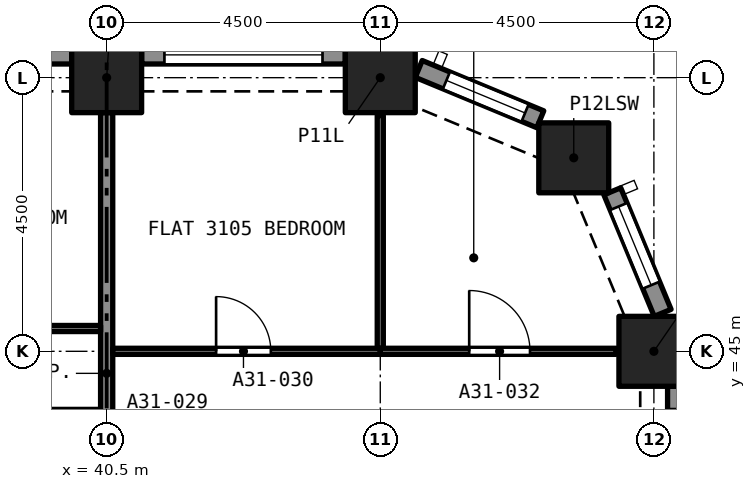
"""IFC4 building model, lengths in metres.
Left out: names, types, materials, properties, quantities, classifications, styles, units other than length and angle.
Written with IfcOpenShell. Run it as: python <this file> out.ifc"""

import sys

from ifc_helpers import new_model, si_unit, direction, frame, frame_2d, origin, origin_2d, place, context, subcontext, project, spatial, rectangle, extrude, element, fill, save


model = new_model("IFC4")
c1 = context("Model", 3, precision=1e-05, world=origin(), true_north=direction((0.0, 1.0)))
c2 = subcontext(c1, "Body", "Model", "MODEL_VIEW")
j1 = project(units=[si_unit("LENGTHUNIT", "METRE"), si_unit("PLANEANGLEUNIT", "RADIAN")], contexts=[c1])
p1 = place(None, origin())
s1 = spatial("IfcSite", under=j1, at=p1, CompositionType="ELEMENT")
p2 = place(p1, origin())
s2 = spatial("IfcBuilding", under=s1, at=p2, CompositionType="ELEMENT")
p3 = place(p2, frame((0.0, 0.0, 112.0)))
s3 = spatial("IfcBuildingStorey", under=s2, at=p3, CompositionType="ELEMENT", Elevation=112.0)
for number, where, z_axis, x_axis in (
    (1, (49.5, 45.0, 0.0), (0.0, 0.0, 1.0), (1.0, 0.0, 0.0)),
    (2, (48.182, 48.182, 0.0), (0.0, 0.0, 1.0), (1.0, 0.0, 0.0)),
    (3, (40.5, 49.5, 0.0), (0.0, 0.0, 1.0), (1.0, 0.0, 0.0)),
    (4, (45.0, 49.5, 0.0), (0.0, 0.0, 1.0), (1.0, 0.0, 0.0)),
):
    element("IfcColumn", number, at=place(p3, frame(where, z_axis=z_axis, x_axis=x_axis)), inside=s3, PredefinedType="COLUMN", context=c2, shape_type="SweptSolid", body=[
        extrude(rectangle(XDim=1.15, YDim=1.15, at=origin_2d()), origin(), (0.0, 0.0, 1.0), 3.2),
    ])
p4 = place(p3, frame((49.875, 44.425, 0.0), z_axis=(0.0, 0.0, 1.0), x_axis=(0.0, -1.0, 0.0)))
e5 = element("IfcWall", 5, at=p4, inside=s3, PredefinedType="SOLIDWALL", context=c2, shape_type="SweptSolid", body=[
    extrude(rectangle(XDim=3.35, YDim=0.3, at=frame_2d((1.675, 0.0))), origin(), (0.0, 0.0, 1.0), 3.2),
])
p5 = place(p4, frame((0.375, 0.0, 0.45)))
e6 = element("IfcOpeningElement", 6, at=p5, cuts=e5, PredefinedType="OPENING", context=c2, shape_type="SweptSolid", body=[
    extrude(rectangle(XDim=2.6, YDim=1.95, at=frame_2d((1.3, 0.975))), frame((0.0, 0.16, 0.0), z_axis=(0.0, -1.0, 0.0), x_axis=(1.0, 0.0, 0.0)), (0.0, 0.0, 1.0), 0.32),
])
p6 = place(p3, frame((48.816, 47.631, 0.0), z_axis=(0.0, 0.0, 1.0), x_axis=(0.382723818695, -0.923862802911, 0.0)))
e7 = element("IfcWall", 7, at=p6, inside=s3, PredefinedType="SOLIDWALL", context=c2, shape_type="SweptSolid", body=[
    extrude(rectangle(XDim=2.164, YDim=0.3, at=frame_2d((1.082, 0.0))), origin(), (0.0, 0.0, 1.0), 3.2),
])
p7 = place(p6, frame((0.271, 0.0, 0.45)))
e8 = element("IfcOpeningElement", 8, at=p7, cuts=e7, PredefinedType="OPENING", context=c2, shape_type="SweptSolid", body=[
    extrude(rectangle(XDim=1.4, YDim=1.95, at=frame_2d((0.7, 0.975))), frame((0.0, 0.16, 0.0), z_axis=(0.0, -1.0, 0.0), x_axis=(1.0, 0.0, 0.0)), (0.0, 0.0, 1.0), 0.32),
])
p8 = place(p3, frame((45.632, 49.644, 0.0), z_axis=(0.0, 0.0, 1.0), x_axis=(0.923862802911, -0.382723818695, 0.0)))
e9 = element("IfcWall", 9, at=p8, inside=s3, PredefinedType="SOLIDWALL", context=c2, shape_type="SweptSolid", body=[
    extrude(rectangle(XDim=2.164, YDim=0.3, at=frame_2d((1.082, 0.0))), origin(), (0.0, 0.0, 1.0), 3.2),
])
p9 = place(p8, frame((0.493, 0.0, 0.45)))
e10 = element("IfcOpeningElement", 10, at=p9, cuts=e9, PredefinedType="OPENING", context=c2, shape_type="SweptSolid", body=[
    extrude(rectangle(XDim=1.4, YDim=1.95, at=frame_2d((0.7, 0.975))), frame((0.0, 0.16, 0.0), z_axis=(0.0, -1.0, 0.0), x_axis=(1.0, 0.0, 0.0)), (0.0, 0.0, 1.0), 0.32),
])
p10 = place(p3, frame((41.075, 49.875, 0.0), z_axis=(0.0, 0.0, 1.0), x_axis=(1.0, 0.0, 0.0)))
e11 = element("IfcWall", 11, at=p10, inside=s3, PredefinedType="SOLIDWALL", context=c2, shape_type="SweptSolid", body=[
    extrude(rectangle(XDim=3.35, YDim=0.3, at=frame_2d((1.675, 0.0))), origin(), (0.0, 0.0, 1.0), 3.2),
])
p11 = place(p10, frame((0.375, 0.0, 0.45)))
e12 = element("IfcOpeningElement", 12, at=p11, cuts=e11, PredefinedType="OPENING", context=c2, shape_type="SweptSolid", body=[
    extrude(rectangle(XDim=2.6, YDim=1.95, at=frame_2d((1.3, 0.975))), frame((0.0, 0.16, 0.0), z_axis=(0.0, -1.0, 0.0), x_axis=(1.0, 0.0, 0.0)), (0.0, 0.0, 1.0), 0.32),
])
p12 = place(p3, frame((36.575, 49.875, 0.0), z_axis=(0.0, 0.0, 1.0), x_axis=(1.0, 0.0, 0.0)))
e13 = element("IfcWall", 13, at=p12, inside=s3, PredefinedType="SOLIDWALL", context=c2, shape_type="SweptSolid", body=[
    extrude(rectangle(XDim=3.35, YDim=0.3, at=frame_2d((1.675, 0.0))), origin(), (0.0, 0.0, 1.0), 3.2),
])
p13 = place(p12, frame((0.375, 0.0, 0.45)))
e14 = element("IfcOpeningElement", 14, at=p13, cuts=e13, PredefinedType="OPENING", context=c2, shape_type="SweptSolid", body=[
    extrude(rectangle(XDim=2.6, YDim=1.95, at=frame_2d((1.3, 0.975))), frame((0.0, 0.16, 0.0), z_axis=(0.0, -1.0, 0.0), x_axis=(1.0, 0.0, 0.0)), (0.0, 0.0, 1.0), 0.32),
])
p14 = place(p3, frame((40.5, 40.35, 0.0), z_axis=(0.0, 0.0, 1.0), x_axis=(0.0, 1.0, 0.0)))
e15 = element("IfcWall", 15, at=p14, inside=s3, PredefinedType="PARTITIONING", context=c2, shape_type="SweptSolid", body=[
    extrude(rectangle(XDim=8.575, YDim=0.2, at=frame_2d((4.288, 0.0))), origin(), (0.0, 0.0, 1.0), 2.9),
])
p15 = place(p3, frame((40.6, 45.0, 0.0), z_axis=(0.0, 0.0, 1.0), x_axis=(1.0, 0.0, 0.0)))
e16 = element("IfcWall", 16, at=p15, inside=s3, PredefinedType="PARTITIONING", context=c2, shape_type="SweptSolid", body=[
    extrude(rectangle(XDim=4.4, YDim=0.1, at=frame_2d((2.2, 0.0))), origin(), (0.0, 0.0, 1.0), 2.9),
])
p16 = place(p15, frame((1.7, 0.0, 0.0)))
e17 = element("IfcOpeningElement", 17, at=p16, cuts=e16, PredefinedType="OPENING", context=c2, shape_type="SweptSolid", body=[
    extrude(rectangle(XDim=0.9, YDim=2.1, at=frame_2d((0.45, 1.05))), frame((0.0, 0.06, 0.0), z_axis=(0.0, -1.0, 0.0), x_axis=(1.0, 0.0, 0.0)), (0.0, 0.0, 1.0), 0.12),
])
p17 = place(p3, frame((45.0, 45.05, 0.0), z_axis=(0.0, 0.0, 1.0), x_axis=(0.0, 1.0, 0.0)))
e18 = element("IfcWall", 18, at=p17, inside=s3, PredefinedType="PARTITIONING", context=c2, shape_type="SweptSolid", body=[
    extrude(rectangle(XDim=3.828, YDim=0.1, at=frame_2d((1.914, 0.0))), origin(), (0.0, 0.0, 1.0), 2.9),
])
p18 = place(p3, frame((45.0, 45.0, 0.0), z_axis=(0.0, 0.0, 1.0), x_axis=(1.0, 0.0, 0.0)))
e19 = element("IfcWall", 19, at=p18, inside=s3, PredefinedType="PARTITIONING", context=c2, shape_type="SweptSolid", body=[
    extrude(rectangle(XDim=3.878, YDim=0.1, at=frame_2d((1.939, 0.0))), origin(), (0.0, 0.0, 1.0), 2.9),
])
p19 = place(p18, frame((1.462, 0.0, 0.0)))
e20 = element("IfcOpeningElement", 20, at=p19, cuts=e19, PredefinedType="OPENING", context=c2, shape_type="SweptSolid", body=[
    extrude(rectangle(XDim=1.0, YDim=2.1, at=frame_2d((0.5, 1.05))), frame((0.0, 0.06, 0.0), z_axis=(0.0, -1.0, 0.0), x_axis=(1.0, 0.0, 0.0)), (0.0, 0.0, 1.0), 0.12),
])
p20 = place(p3, frame((36.0, 45.375, 0.0), z_axis=(0.0, 0.0, 1.0), x_axis=(1.0, 0.0, 0.0)))
e21 = element("IfcWall", 21, at=p20, inside=s3, PredefinedType="PARTITIONING", context=c2, shape_type="SweptSolid", body=[
    extrude(rectangle(XDim=4.4, YDim=0.1, at=frame_2d((2.2, 0.0))), origin(), (0.0, 0.0, 1.0), 2.9),
])
p21 = place(p20, frame((1.8, 0.0, 0.0)))
e22 = element("IfcOpeningElement", 22, at=p21, cuts=e21, PredefinedType="OPENING", context=c2, shape_type="SweptSolid", body=[
    extrude(rectangle(XDim=0.9, YDim=2.1, at=frame_2d((0.45, 1.05))), frame((0.0, 0.06, 0.0), z_axis=(0.0, -1.0, 0.0), x_axis=(1.0, 0.0, 0.0)), (0.0, 0.0, 1.0), 0.12),
])
p22 = place(p7, origin())
e23 = element("IfcWindow", 23, at=p22, inside=s3, PartitioningType="SINGLE_PANEL", PredefinedType="WINDOW", context=c2, shape_type="SweptSolid", body=[
    extrude(rectangle(XDim=1.4, YDim=1.95, at=frame_2d((0.7, 0.975))), frame((0.0, 0.03, 0.0), z_axis=(0.0, -1.0, 0.0), x_axis=(1.0, 0.0, 0.0)), (0.0, 0.0, 1.0), 0.06),
])
fill(e8, e23)
p23 = place(p9, origin())
e24 = element("IfcWindow", 24, at=p23, inside=s3, PartitioningType="SINGLE_PANEL", PredefinedType="WINDOW", context=c2, shape_type="SweptSolid", body=[
    extrude(rectangle(XDim=1.4, YDim=1.95, at=frame_2d((0.7, 0.975))), frame((0.0, 0.03, 0.0), z_axis=(0.0, -1.0, 0.0), x_axis=(1.0, 0.0, 0.0)), (0.0, 0.0, 1.0), 0.06),
])
fill(e10, e24)
p24 = place(p11, origin())
e25 = element("IfcWindow", 25, at=p24, inside=s3, PartitioningType="SINGLE_PANEL", PredefinedType="WINDOW", context=c2, shape_type="SweptSolid", body=[
    extrude(rectangle(XDim=2.6, YDim=1.95, at=frame_2d((1.3, 0.975))), frame((0.0, 0.03, 0.0), z_axis=(0.0, -1.0, 0.0), x_axis=(1.0, 0.0, 0.0)), (0.0, 0.0, 1.0), 0.06),
])
fill(e12, e25)
p25 = place(p16, origin())
e26 = element("IfcDoor", 26, at=p25, inside=s3, OperationType="SINGLE_SWING_LEFT", PredefinedType="DOOR", context=c2, shape_type="SweptSolid", body=[
    extrude(rectangle(XDim=0.9, YDim=2.1, at=frame_2d((0.45, 1.05))), frame((0.0, 0.025, 0.0), z_axis=(0.0, -1.0, 0.0), x_axis=(1.0, 0.0, 0.0)), (0.0, 0.0, 1.0), 0.05),
])
fill(e17, e26)
p26 = place(p19, origin())
e27 = element("IfcDoor", 27, at=p26, inside=s3, OperationType="SINGLE_SWING_RIGHT", PredefinedType="DOOR", context=c2, shape_type="SweptSolid", body=[
    extrude(rectangle(XDim=1.0, YDim=2.1, at=frame_2d((0.5, 1.05))), frame((0.0, 0.025, 0.0), z_axis=(0.0, -1.0, 0.0), x_axis=(1.0, 0.0, 0.0)), (0.0, 0.0, 1.0), 0.05),
])
fill(e20, e27)
save(model, sys.argv[1])
